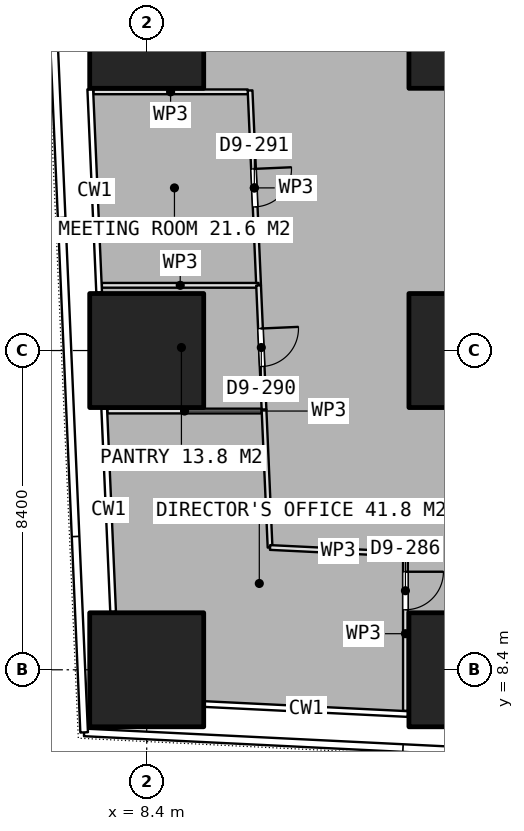
"""IFC4 building model, lengths in metres.
Left out: names, types, materials, properties, quantities, classifications, styles, units other than length and angle.
Written with IfcOpenShell. Run it as: python <this file> out.ifc"""

import sys

from ifc_helpers import new_model, si_unit, direction, frame, frame_2d, origin, origin_2d, place, context, subcontext, project, spatial, rectangle, extrude, element, fill, save


model = new_model("IFC4")
c1 = context("Model", 3, precision=1e-05, world=origin(), true_north=direction((0.0, 1.0)))
c2 = subcontext(c1, "Body", "Model", "MODEL_VIEW")
j1 = project(units=[si_unit("LENGTHUNIT", "METRE"), si_unit("PLANEANGLEUNIT", "RADIAN")], contexts=[c1])
p1 = place(None, origin())
s1 = spatial("IfcSite", under=j1, at=p1, CompositionType="ELEMENT")
p2 = place(p1, origin())
s2 = spatial("IfcBuilding", under=s1, at=p2, CompositionType="ELEMENT")
p3 = place(p2, frame((0.0, 0.0, 81.65)))
s3 = spatial("IfcBuildingStorey", under=s2, at=p3, CompositionType="ELEMENT", Elevation=81.65)
for number, where, z_axis, x_axis in (
    (1, (8.4, 8.4, 0.0), (0.0, 0.0, 1.0), (1.0, 0.0, 0.0)),
    (2, (8.4, 16.8, 0.0), (0.0, 0.0, 1.0), (1.0, 0.0, 0.0)),
    (3, (8.4, 25.2, 0.0), (0.0, 0.0, 1.0), (1.0, 0.0, 0.0)),
    (4, (16.8, 8.4, 0.0), (0.0, 0.0, 1.0), (1.0, 0.0, 0.0)),
    (5, (16.8, 16.8, 0.0), (0.0, 0.0, 1.0), (1.0, 0.0, 0.0)),
    (6, (16.8, 25.2, 0.0), (0.0, 0.0, 1.0), (1.0, 0.0, 0.0)),
):
    element("IfcColumn", number, at=place(p3, frame(where, z_axis=z_axis, x_axis=x_axis)), inside=s3, PredefinedType="COLUMN", context=c2, shape_type="SweptSolid", body=[
        extrude(rectangle(XDim=3.0, YDim=3.0, at=origin_2d()), origin(), (0.0, 0.0, 1.0), 3.75),
    ])
p4 = place(p3, frame((11.12, 23.643, 0.0), z_axis=(0.0, 0.0, 1.0), x_axis=(0.043625094794, -0.999047972374, 0.0)))
e7 = element("IfcWall", 7, at=p4, inside=s3, PredefinedType="PARTITIONING", context=c2, shape_type="SweptSolid", body=[
    extrude(rectangle(XDim=5.132, YDim=0.125, at=frame_2d((2.566, 0.0))), origin(), (0.0, 0.0, 1.0), 3.4),
])
p5 = place(p4, frame((2.066, 0.0, 0.0)))
e8 = element("IfcOpeningElement", 8, at=p5, cuts=e7, PredefinedType="OPENING", context=c2, shape_type="SweptSolid", body=[
    extrude(rectangle(XDim=1.0, YDim=2.1, at=frame_2d((0.5, 1.05))), frame((0.0, 0.073, 0.0), z_axis=(0.0, -1.0, 0.0), x_axis=(1.0, 0.0, 0.0)), (0.0, 0.0, 1.0), 0.145),
])
p6 = place(p3, frame((11.344, 18.516, 0.0), z_axis=(0.0, 0.0, 1.0), x_axis=(-1.0, 0.0, 0.0)))
e9 = element("IfcWall", 9, at=p6, inside=s3, PredefinedType="PARTITIONING", context=c2, shape_type="SweptSolid", body=[
    extrude(rectangle(XDim=4.124, YDim=0.125, at=frame_2d((2.062, 0.0))), origin(), (0.0, 0.0, 1.0), 3.4),
])
p7 = place(p3, frame((6.998, 23.607, 0.0), z_axis=(0.0, 0.0, 1.0), x_axis=(1.0, 0.0, 0.0)))
e10 = element("IfcWall", 10, at=p7, inside=s3, PredefinedType="PARTITIONING", context=c2, shape_type="SweptSolid", body=[
    extrude(rectangle(XDim=4.061, YDim=0.125, at=frame_2d((2.031, 0.0))), origin(), (0.0, 0.0, 1.0), 3.4),
])
p8 = place(p3, frame((11.344, 18.515, 0.0), z_axis=(0.0, 0.0, 1.0), x_axis=(0.043696095948, -0.999044869462, 0.0)))
e11 = element("IfcWall", 11, at=p8, inside=s3, PredefinedType="PARTITIONING", context=c2, shape_type="SweptSolid", body=[
    extrude(rectangle(XDim=3.274, YDim=0.125, at=frame_2d((1.637, 0.0))), origin(), (0.0, 0.0, 1.0), 3.4),
])
p9 = place(p8, frame((1.137, 0.0, 0.0)))
e12 = element("IfcOpeningElement", 12, at=p9, cuts=e11, PredefinedType="OPENING", context=c2, shape_type="SweptSolid", body=[
    extrude(rectangle(XDim=1.0, YDim=2.1, at=frame_2d((0.5, 1.05))), frame((0.0, 0.073, 0.0), z_axis=(0.0, -1.0, 0.0), x_axis=(1.0, 0.0, 0.0)), (0.0, 0.0, 1.0), 0.145),
])
p10 = place(p3, frame((11.426, 15.208, 0.0), z_axis=(0.0, 0.0, 1.0), x_axis=(-1.0, 0.0, 0.0)))
e13 = element("IfcWall", 13, at=p10, inside=s3, PredefinedType="PARTITIONING", context=c2, shape_type="SweptSolid", body=[
    extrude(rectangle(XDim=4.061, YDim=0.125, at=frame_2d((2.031, 0.0))), origin(), (0.0, 0.0, 1.0), 3.4),
])
p11 = place(p3, frame((11.487, 15.243, 0.0), z_axis=(0.0, 0.0, 1.0), x_axis=(0.04380220804, -0.999040222699, 0.0)))
e14 = element("IfcWall", 14, at=p11, inside=s3, PredefinedType="PARTITIONING", context=c2, shape_type="SweptSolid", body=[
    extrude(rectangle(XDim=3.628, YDim=0.125, at=frame_2d((1.814, 0.0))), origin(), (0.0, 0.0, 1.0), 3.4),
])
p12 = place(p3, frame((11.646, 11.618, 0.0), z_axis=(0.0, 0.0, 1.0), x_axis=(0.998804046287, -0.048892505762, 0.0)))
e15 = element("IfcWall", 15, at=p12, inside=s3, PredefinedType="PARTITIONING", context=c2, shape_type="SweptSolid", body=[
    extrude(rectangle(XDim=3.6, YDim=0.125, at=frame_2d((1.8, 0.0))), origin(), (0.0, 0.0, 1.0), 3.4),
])
p13 = place(p3, frame((15.208, 11.381, 0.0), z_axis=(0.0, 0.0, 1.0), x_axis=(0.0, -1.0, 0.0)))
e16 = element("IfcWall", 16, at=p13, inside=s3, PredefinedType="PARTITIONING", context=c2, shape_type="SweptSolid", body=[
    extrude(rectangle(XDim=4.063, YDim=0.125, at=frame_2d((2.031, 0.0))), origin(), (0.0, 0.0, 1.0), 3.4),
])
p14 = place(p13, frame((0.401, 0.0, 0.0)))
e17 = element("IfcOpeningElement", 17, at=p14, cuts=e16, PredefinedType="OPENING", context=c2, shape_type="SweptSolid", body=[
    extrude(rectangle(XDim=1.0, YDim=2.1, at=frame_2d((0.5, 1.05))), frame((0.0, 0.073, 0.0), z_axis=(0.0, -1.0, 0.0), x_axis=(1.0, 0.0, 0.0)), (0.0, 0.0, 1.0), 0.145),
])
p15 = place(p5, origin())
e18 = element("IfcDoor", 18, at=p15, inside=s3, OperationType="SINGLE_SWING_LEFT", PredefinedType="DOOR", context=c2, shape_type="SweptSolid", body=[
    extrude(rectangle(XDim=1.0, YDim=2.1, at=frame_2d((0.5, 1.05))), frame((0.0, 0.025, 0.0), z_axis=(0.0, -1.0, 0.0), x_axis=(1.0, 0.0, 0.0)), (0.0, 0.0, 1.0), 0.05),
])
fill(e8, e18)
p16 = place(p9, origin())
e19 = element("IfcDoor", 19, at=p16, inside=s3, OperationType="SINGLE_SWING_LEFT", PredefinedType="DOOR", context=c2, shape_type="SweptSolid", body=[
    extrude(rectangle(XDim=1.0, YDim=2.1, at=frame_2d((0.5, 1.05))), frame((0.0, 0.025, 0.0), z_axis=(0.0, -1.0, 0.0), x_axis=(1.0, 0.0, 0.0)), (0.0, 0.0, 1.0), 0.05),
])
fill(e12, e19)
p17 = place(p14, origin())
e20 = element("IfcDoor", 20, at=p17, inside=s3, OperationType="SINGLE_SWING_LEFT", PredefinedType="DOOR", context=c2, shape_type="SweptSolid", body=[
    extrude(rectangle(XDim=1.0, YDim=2.1, at=frame_2d((0.5, 1.05))), frame((0.0, 0.025, 0.0), z_axis=(0.0, -1.0, 0.0), x_axis=(1.0, 0.0, 0.0)), (0.0, 0.0, 1.0), 0.05),
])
fill(e17, e20)
save(model, sys.argv[1])
